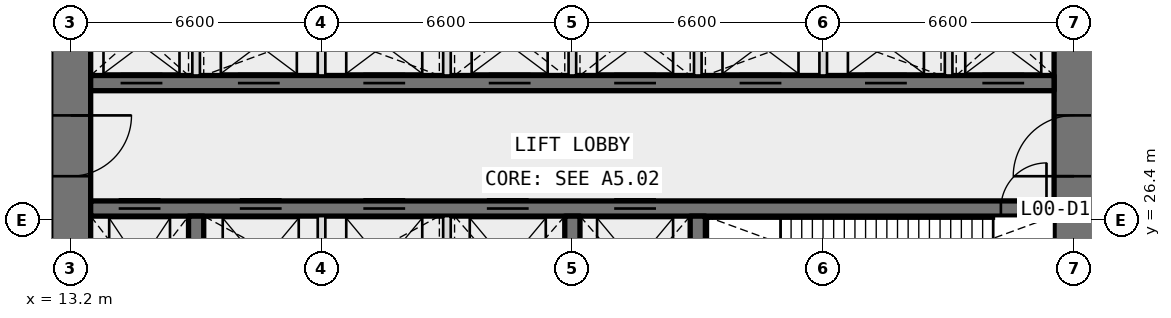
"""IFC4 building model, lengths in metres.
Left out: names, types, materials, properties, quantities, classifications, styles, units other than length and angle.
Written with IfcOpenShell. Run it as: python <this file> out.ifc"""

import sys

from ifc_helpers import new_model, si_unit, direction, frame, frame_2d, origin, place, context, subcontext, project, spatial, rectangle, extrude, element, fill, save


model = new_model("IFC4")
c1 = context("Model", 3, precision=1e-05, world=origin(), true_north=direction((0.0, 1.0)))
c2 = subcontext(c1, "Body", "Model", "MODEL_VIEW")
j1 = project(units=[si_unit("LENGTHUNIT", "METRE"), si_unit("PLANEANGLEUNIT", "RADIAN")], contexts=[c1])
p1 = place(None, origin())
s1 = spatial("IfcSite", under=j1, at=p1, CompositionType="ELEMENT")
p2 = place(p1, origin())
s2 = spatial("IfcBuilding", under=s1, at=p2, CompositionType="ELEMENT")
p3 = place(p2, origin())
s3 = spatial("IfcBuildingStorey", under=s2, at=p3, CompositionType="ELEMENT", Elevation=0.0)
p4 = place(p3, frame((39.6, 13.725, 0.0), z_axis=(0.0, 0.0, 1.0), x_axis=(0.0, 1.0, 0.0)))
e1 = element("IfcWall", 1, at=p4, inside=s3, PredefinedType="SHEAR", context=c2, shape_type="SweptSolid", body=[
    extrude(rectangle(XDim=18.75, YDim=1.05, at=frame_2d((9.375, 0.0))), origin(), (0.0, 0.0, 1.0), 7.2),
])
p5 = place(p4, frame((3.025, 0.0, 0.0)))
e2 = element("IfcOpeningElement", 2, at=p5, cuts=e1, PredefinedType="OPENING", context=c2, shape_type="SweptSolid", body=[
    extrude(rectangle(XDim=1.6, YDim=2.1, at=frame_2d((0.8, 1.05))), frame((0.0, 0.535, 0.0), z_axis=(0.0, -1.0, 0.0), x_axis=(1.0, 0.0, 0.0)), (0.0, 0.0, 1.0), 1.07),
])
p6 = place(p4, frame((13.825, 0.0, 0.0)))
e3 = element("IfcOpeningElement", 3, at=p6, cuts=e1, PredefinedType="OPENING", context=c2, shape_type="SweptSolid", body=[
    extrude(rectangle(XDim=1.6, YDim=2.1, at=frame_2d((0.8, 1.05))), frame((0.0, 0.535, 0.0), z_axis=(0.0, -1.0, 0.0), x_axis=(1.0, 0.0, 0.0)), (0.0, 0.0, 1.0), 1.07),
])
p7 = place(p3, frame((13.2, 32.475, 0.0), z_axis=(0.0, 0.0, 1.0), x_axis=(0.0, -1.0, 0.0)))
e4 = element("IfcWall", 4, at=p7, inside=s3, PredefinedType="SHEAR", context=c2, shape_type="SweptSolid", body=[
    extrude(rectangle(XDim=18.75, YDim=1.05, at=frame_2d((9.375, 0.0))), origin(), (0.0, 0.0, 1.0), 7.2),
])
p8 = place(p7, frame((14.125, 0.0, 0.0)))
e5 = element("IfcOpeningElement", 5, at=p8, cuts=e4, PredefinedType="OPENING", context=c2, shape_type="SweptSolid", body=[
    extrude(rectangle(XDim=1.6, YDim=2.1, at=frame_2d((0.8, 1.05))), frame((0.0, 0.535, 0.0), z_axis=(0.0, -1.0, 0.0), x_axis=(1.0, 0.0, 0.0)), (0.0, 0.0, 1.0), 1.07),
])
p9 = place(p7, frame((3.325, 0.0, 0.0)))
e6 = element("IfcOpeningElement", 6, at=p9, cuts=e4, PredefinedType="OPENING", context=c2, shape_type="SweptSolid", body=[
    extrude(rectangle(XDim=1.6, YDim=2.1, at=frame_2d((0.8, 1.05))), frame((0.0, 0.535, 0.0), z_axis=(0.0, -1.0, 0.0), x_axis=(1.0, 0.0, 0.0)), (0.0, 0.0, 1.0), 1.07),
])
p10 = place(p3, frame((13.725, 26.7, 0.0), z_axis=(0.0, 0.0, 1.0), x_axis=(1.0, 0.0, 0.0)))
e7 = element("IfcWall", 7, at=p10, inside=s3, PredefinedType="SHEAR", context=c2, shape_type="SweptSolid", body=[
    extrude(rectangle(XDim=25.35, YDim=0.4, at=frame_2d((12.675, 0.0))), origin(), (0.0, 0.0, 1.0), 7.2),
])
p11 = place(p10, frame((23.95, 0.0, 0.0)))
e8 = element("IfcOpeningElement", 8, at=p11, cuts=e7, PredefinedType="OPENING", context=c2, shape_type="SweptSolid", body=[
    extrude(rectangle(XDim=1.2, YDim=2.1, at=frame_2d((0.6, 1.05))), frame((0.0, 0.21, 0.0), z_axis=(0.0, -1.0, 0.0), x_axis=(1.0, 0.0, 0.0)), (0.0, 0.0, 1.0), 0.42),
])
p12 = place(p10, frame((0.738, 0.0, 0.0)))
e9 = element("IfcOpeningElement", 9, at=p12, cuts=e7, PredefinedType="OPENING", context=c2, shape_type="SweptSolid", body=[
    extrude(rectangle(XDim=1.1, YDim=2.1, at=frame_2d((0.55, 1.05))), frame((0.0, 0.21, 0.0), z_axis=(0.0, -1.0, 0.0), x_axis=(1.0, 0.0, 0.0)), (0.0, 0.0, 1.0), 0.42),
])
p13 = place(p10, frame((3.925, 0.0, 0.0)))
e10 = element("IfcOpeningElement", 10, at=p13, cuts=e7, PredefinedType="OPENING", context=c2, shape_type="SweptSolid", body=[
    extrude(rectangle(XDim=1.1, YDim=2.1, at=frame_2d((0.55, 1.05))), frame((0.0, 0.21, 0.0), z_axis=(0.0, -1.0, 0.0), x_axis=(1.0, 0.0, 0.0)), (0.0, 0.0, 1.0), 0.42),
])
p14 = place(p10, frame((7.175, 0.0, 0.0)))
e11 = element("IfcOpeningElement", 11, at=p14, cuts=e7, PredefinedType="OPENING", context=c2, shape_type="SweptSolid", body=[
    extrude(rectangle(XDim=1.1, YDim=2.1, at=frame_2d((0.55, 1.05))), frame((0.0, 0.21, 0.0), z_axis=(0.0, -1.0, 0.0), x_axis=(1.0, 0.0, 0.0)), (0.0, 0.0, 1.0), 0.42),
])
p15 = place(p10, frame((10.425, 0.0, 0.0)))
e12 = element("IfcOpeningElement", 12, at=p15, cuts=e7, PredefinedType="OPENING", context=c2, shape_type="SweptSolid", body=[
    extrude(rectangle(XDim=1.1, YDim=2.1, at=frame_2d((0.55, 1.05))), frame((0.0, 0.21, 0.0), z_axis=(0.0, -1.0, 0.0), x_axis=(1.0, 0.0, 0.0)), (0.0, 0.0, 1.0), 0.42),
])
p16 = place(p10, frame((13.775, 0.0, 0.0)))
e13 = element("IfcOpeningElement", 13, at=p16, cuts=e7, PredefinedType="OPENING", context=c2, shape_type="SweptSolid", body=[
    extrude(rectangle(XDim=1.1, YDim=2.1, at=frame_2d((0.55, 1.05))), frame((0.0, 0.21, 0.0), z_axis=(0.0, -1.0, 0.0), x_axis=(1.0, 0.0, 0.0)), (0.0, 0.0, 1.0), 0.42),
])
p17 = place(p3, frame((13.725, 30.0, 0.0), z_axis=(0.0, 0.0, 1.0), x_axis=(1.0, 0.0, 0.0)))
e14 = element("IfcWall", 14, at=p17, inside=s3, PredefinedType="SHEAR", context=c2, shape_type="SweptSolid", body=[
    extrude(rectangle(XDim=25.35, YDim=0.4, at=frame_2d((12.675, 0.0))), origin(), (0.0, 0.0, 1.0), 7.2),
])
p18 = place(p17, frame((0.788, 0.0, 0.0)))
e15 = element("IfcOpeningElement", 15, at=p18, cuts=e14, PredefinedType="OPENING", context=c2, shape_type="SweptSolid", body=[
    extrude(rectangle(XDim=1.1, YDim=2.1, at=frame_2d((0.55, 1.05))), frame((0.0, 0.21, 0.0), z_axis=(0.0, -1.0, 0.0), x_axis=(1.0, 0.0, 0.0)), (0.0, 0.0, 1.0), 0.42),
])
p19 = place(p17, frame((3.875, 0.0, 0.0)))
e16 = element("IfcOpeningElement", 16, at=p19, cuts=e14, PredefinedType="OPENING", context=c2, shape_type="SweptSolid", body=[
    extrude(rectangle(XDim=1.1, YDim=2.1, at=frame_2d((0.55, 1.05))), frame((0.0, 0.21, 0.0), z_axis=(0.0, -1.0, 0.0), x_axis=(1.0, 0.0, 0.0)), (0.0, 0.0, 1.0), 0.42),
])
p20 = place(p17, frame((7.175, 0.0, 0.0)))
e17 = element("IfcOpeningElement", 17, at=p20, cuts=e14, PredefinedType="OPENING", context=c2, shape_type="SweptSolid", body=[
    extrude(rectangle(XDim=1.1, YDim=2.1, at=frame_2d((0.55, 1.05))), frame((0.0, 0.21, 0.0), z_axis=(0.0, -1.0, 0.0), x_axis=(1.0, 0.0, 0.0)), (0.0, 0.0, 1.0), 0.42),
])
p21 = place(p17, frame((10.475, 0.0, 0.0)))
e18 = element("IfcOpeningElement", 18, at=p21, cuts=e14, PredefinedType="OPENING", context=c2, shape_type="SweptSolid", body=[
    extrude(rectangle(XDim=1.1, YDim=2.1, at=frame_2d((0.55, 1.05))), frame((0.0, 0.21, 0.0), z_axis=(0.0, -1.0, 0.0), x_axis=(1.0, 0.0, 0.0)), (0.0, 0.0, 1.0), 0.42),
])
p22 = place(p17, frame((13.775, 0.0, 0.0)))
e19 = element("IfcOpeningElement", 19, at=p22, cuts=e14, PredefinedType="OPENING", context=c2, shape_type="SweptSolid", body=[
    extrude(rectangle(XDim=1.1, YDim=2.1, at=frame_2d((0.55, 1.05))), frame((0.0, 0.21, 0.0), z_axis=(0.0, -1.0, 0.0), x_axis=(1.0, 0.0, 0.0)), (0.0, 0.0, 1.0), 0.42),
])
p23 = place(p17, frame((17.075, 0.0, 0.0)))
e20 = element("IfcOpeningElement", 20, at=p23, cuts=e14, PredefinedType="OPENING", context=c2, shape_type="SweptSolid", body=[
    extrude(rectangle(XDim=1.1, YDim=2.1, at=frame_2d((0.55, 1.05))), frame((0.0, 0.21, 0.0), z_axis=(0.0, -1.0, 0.0), x_axis=(1.0, 0.0, 0.0)), (0.0, 0.0, 1.0), 0.42),
])
p24 = place(p17, frame((20.375, 0.0, 0.0)))
e21 = element("IfcOpeningElement", 21, at=p24, cuts=e14, PredefinedType="OPENING", context=c2, shape_type="SweptSolid", body=[
    extrude(rectangle(XDim=1.1, YDim=2.1, at=frame_2d((0.55, 1.05))), frame((0.0, 0.21, 0.0), z_axis=(0.0, -1.0, 0.0), x_axis=(1.0, 0.0, 0.0)), (0.0, 0.0, 1.0), 0.42),
])
p25 = place(p17, frame((23.462, 0.0, 0.0)))
e22 = element("IfcOpeningElement", 22, at=p25, cuts=e14, PredefinedType="OPENING", context=c2, shape_type="SweptSolid", body=[
    extrude(rectangle(XDim=1.1, YDim=2.1, at=frame_2d((0.55, 1.05))), frame((0.0, 0.21, 0.0), z_axis=(0.0, -1.0, 0.0), x_axis=(1.0, 0.0, 0.0)), (0.0, 0.0, 1.0), 0.42),
])
for number, where, z_axis, x_axis in (
    (23, (16.5, 23.15, 0.0), (0.0, 0.0, 1.0), (0.0, 1.0, 0.0)),
    (24, (26.4, 23.15, 0.0), (0.0, 0.0, 1.0), (0.0, 1.0, 0.0)),
    (25, (29.7, 23.15, 0.0), (0.0, 0.0, 1.0), (0.0, 1.0, 0.0)),
):
    element("IfcWall", number, at=place(p3, frame(where, z_axis=z_axis, x_axis=x_axis)), inside=s3, PredefinedType="SHEAR", context=c2, shape_type="SweptSolid", body=[
        extrude(rectangle(XDim=3.35, YDim=0.4, at=frame_2d((1.675, 0.0))), origin(), (0.0, 0.0, 1.0), 7.2),
    ])
for number, where, z_axis, x_axis in (
    (26, (16.5, 30.2, 0.0), (0.0, 0.0, 1.0), (0.0, 1.0, 0.0)),
    (27, (19.8, 30.2, 0.0), (0.0, 0.0, 1.0), (0.0, 1.0, 0.0)),
    (28, (23.1, 30.2, 0.0), (0.0, 0.0, 1.0), (0.0, 1.0, 0.0)),
    (29, (26.4, 30.2, 0.0), (0.0, 0.0, 1.0), (0.0, 1.0, 0.0)),
    (30, (29.7, 30.2, 0.0), (0.0, 0.0, 1.0), (0.0, 1.0, 0.0)),
    (31, (33.0, 30.2, 0.0), (0.0, 0.0, 1.0), (0.0, 1.0, 0.0)),
    (32, (36.3, 30.2, 0.0), (0.0, 0.0, 1.0), (0.0, 1.0, 0.0)),
):
    element("IfcWall", number, at=place(p3, frame(where, z_axis=z_axis, x_axis=x_axis)), inside=s3, PredefinedType="PARTITIONING", context=c2, shape_type="SweptSolid", body=[
        extrude(rectangle(XDim=2.275, YDim=0.2, at=frame_2d((1.138, 0.0))), origin(), (0.0, 0.0, 1.0), 7.2),
    ])
for number, where, z_axis, x_axis in (
    (33, (19.8, 23.15, 0.0), (0.0, 0.0, 1.0), (0.0, 1.0, 0.0)),
    (34, (23.1, 23.15, 0.0), (0.0, 0.0, 1.0), (0.0, 1.0, 0.0)),
):
    element("IfcWall", number, at=place(p3, frame(where, z_axis=z_axis, x_axis=x_axis)), inside=s3, PredefinedType="PARTITIONING", context=c2, shape_type="SweptSolid", body=[
        extrude(rectangle(XDim=3.35, YDim=0.2, at=frame_2d((1.675, 0.0))), origin(), (0.0, 0.0, 1.0), 7.2),
    ])
p26 = place(p11, origin())
e35 = element("IfcDoor", 35, at=p26, inside=s3, OperationType="SINGLE_SWING_RIGHT", PredefinedType="DOOR", context=c2, shape_type="SweptSolid", body=[
    extrude(rectangle(XDim=1.2, YDim=2.1, at=frame_2d((0.6, 1.05))), frame((0.0, 0.025, 0.0), z_axis=(0.0, -1.0, 0.0), x_axis=(1.0, 0.0, 0.0)), (0.0, 0.0, 1.0), 0.05),
])
fill(e8, e35)
p27 = place(p9, origin())
e36 = element("IfcDoor", 36, at=p27, inside=s3, OperationType="DOUBLE_DOOR_DOUBLE_SWING", PredefinedType="DOOR", context=c2, shape_type="SweptSolid", body=[
    extrude(rectangle(XDim=1.6, YDim=2.1, at=frame_2d((0.8, 1.05))), frame((0.0, 0.025, 0.0), z_axis=(0.0, -1.0, 0.0), x_axis=(1.0, 0.0, 0.0)), (0.0, 0.0, 1.0), 0.05),
])
fill(e6, e36)
p28 = place(p6, origin())
e37 = element("IfcDoor", 37, at=p28, inside=s3, OperationType="DOUBLE_DOOR_DOUBLE_SWING", PredefinedType="DOOR", context=c2, shape_type="SweptSolid", body=[
    extrude(rectangle(XDim=1.6, YDim=2.1, at=frame_2d((0.8, 1.05))), frame((0.0, 0.025, 0.0), z_axis=(0.0, -1.0, 0.0), x_axis=(1.0, 0.0, 0.0)), (0.0, 0.0, 1.0), 0.05),
])
fill(e3, e37)
p29 = place(p18, origin())
e38 = element("IfcDoor", 38, at=p29, inside=s3, OperationType="DOUBLE_DOOR_SLIDING", PredefinedType="DOOR", context=c2, shape_type="SweptSolid", body=[
    extrude(rectangle(XDim=1.1, YDim=2.1, at=frame_2d((0.55, 1.05))), frame((0.0, 0.025, 0.0), z_axis=(0.0, -1.0, 0.0), x_axis=(1.0, 0.0, 0.0)), (0.0, 0.0, 1.0), 0.05),
])
fill(e15, e38)
p30 = place(p19, origin())
e39 = element("IfcDoor", 39, at=p30, inside=s3, OperationType="DOUBLE_DOOR_SLIDING", PredefinedType="DOOR", context=c2, shape_type="SweptSolid", body=[
    extrude(rectangle(XDim=1.1, YDim=2.1, at=frame_2d((0.55, 1.05))), frame((0.0, 0.025, 0.0), z_axis=(0.0, -1.0, 0.0), x_axis=(1.0, 0.0, 0.0)), (0.0, 0.0, 1.0), 0.05),
])
fill(e16, e39)
p31 = place(p20, origin())
e40 = element("IfcDoor", 40, at=p31, inside=s3, OperationType="DOUBLE_DOOR_SLIDING", PredefinedType="DOOR", context=c2, shape_type="SweptSolid", body=[
    extrude(rectangle(XDim=1.1, YDim=2.1, at=frame_2d((0.55, 1.05))), frame((0.0, 0.025, 0.0), z_axis=(0.0, -1.0, 0.0), x_axis=(1.0, 0.0, 0.0)), (0.0, 0.0, 1.0), 0.05),
])
fill(e17, e40)
p32 = place(p21, origin())
e41 = element("IfcDoor", 41, at=p32, inside=s3, OperationType="DOUBLE_DOOR_SLIDING", PredefinedType="DOOR", context=c2, shape_type="SweptSolid", body=[
    extrude(rectangle(XDim=1.1, YDim=2.1, at=frame_2d((0.55, 1.05))), frame((0.0, 0.025, 0.0), z_axis=(0.0, -1.0, 0.0), x_axis=(1.0, 0.0, 0.0)), (0.0, 0.0, 1.0), 0.05),
])
fill(e18, e41)
p33 = place(p22, origin())
e42 = element("IfcDoor", 42, at=p33, inside=s3, OperationType="DOUBLE_DOOR_SLIDING", PredefinedType="DOOR", context=c2, shape_type="SweptSolid", body=[
    extrude(rectangle(XDim=1.1, YDim=2.1, at=frame_2d((0.55, 1.05))), frame((0.0, 0.025, 0.0), z_axis=(0.0, -1.0, 0.0), x_axis=(1.0, 0.0, 0.0)), (0.0, 0.0, 1.0), 0.05),
])
fill(e19, e42)
p34 = place(p23, origin())
e43 = element("IfcDoor", 43, at=p34, inside=s3, OperationType="DOUBLE_DOOR_SLIDING", PredefinedType="DOOR", context=c2, shape_type="SweptSolid", body=[
    extrude(rectangle(XDim=1.1, YDim=2.1, at=frame_2d((0.55, 1.05))), frame((0.0, 0.025, 0.0), z_axis=(0.0, -1.0, 0.0), x_axis=(1.0, 0.0, 0.0)), (0.0, 0.0, 1.0), 0.05),
])
fill(e20, e43)
p35 = place(p24, origin())
e44 = element("IfcDoor", 44, at=p35, inside=s3, OperationType="DOUBLE_DOOR_SLIDING", PredefinedType="DOOR", context=c2, shape_type="SweptSolid", body=[
    extrude(rectangle(XDim=1.1, YDim=2.1, at=frame_2d((0.55, 1.05))), frame((0.0, 0.025, 0.0), z_axis=(0.0, -1.0, 0.0), x_axis=(1.0, 0.0, 0.0)), (0.0, 0.0, 1.0), 0.05),
])
fill(e21, e44)
p36 = place(p25, origin())
e45 = element("IfcDoor", 45, at=p36, inside=s3, OperationType="DOUBLE_DOOR_SLIDING", PredefinedType="DOOR", context=c2, shape_type="SweptSolid", body=[
    extrude(rectangle(XDim=1.1, YDim=2.1, at=frame_2d((0.55, 1.05))), frame((0.0, 0.025, 0.0), z_axis=(0.0, -1.0, 0.0), x_axis=(1.0, 0.0, 0.0)), (0.0, 0.0, 1.0), 0.05),
])
fill(e22, e45)
p37 = place(p12, origin())
e46 = element("IfcDoor", 46, at=p37, inside=s3, OperationType="DOUBLE_DOOR_SLIDING", PredefinedType="DOOR", context=c2, shape_type="SweptSolid", body=[
    extrude(rectangle(XDim=1.1, YDim=2.1, at=frame_2d((0.55, 1.05))), frame((0.0, 0.025, 0.0), z_axis=(0.0, -1.0, 0.0), x_axis=(1.0, 0.0, 0.0)), (0.0, 0.0, 1.0), 0.05),
])
fill(e9, e46)
p38 = place(p13, origin())
e47 = element("IfcDoor", 47, at=p38, inside=s3, OperationType="DOUBLE_DOOR_SLIDING", PredefinedType="DOOR", context=c2, shape_type="SweptSolid", body=[
    extrude(rectangle(XDim=1.1, YDim=2.1, at=frame_2d((0.55, 1.05))), frame((0.0, 0.025, 0.0), z_axis=(0.0, -1.0, 0.0), x_axis=(1.0, 0.0, 0.0)), (0.0, 0.0, 1.0), 0.05),
])
fill(e10, e47)
p39 = place(p14, origin())
e48 = element("IfcDoor", 48, at=p39, inside=s3, OperationType="DOUBLE_DOOR_SLIDING", PredefinedType="DOOR", context=c2, shape_type="SweptSolid", body=[
    extrude(rectangle(XDim=1.1, YDim=2.1, at=frame_2d((0.55, 1.05))), frame((0.0, 0.025, 0.0), z_axis=(0.0, -1.0, 0.0), x_axis=(1.0, 0.0, 0.0)), (0.0, 0.0, 1.0), 0.05),
])
fill(e11, e48)
p40 = place(p15, origin())
e49 = element("IfcDoor", 49, at=p40, inside=s3, OperationType="DOUBLE_DOOR_SLIDING", PredefinedType="DOOR", context=c2, shape_type="SweptSolid", body=[
    extrude(rectangle(XDim=1.1, YDim=2.1, at=frame_2d((0.55, 1.05))), frame((0.0, 0.025, 0.0), z_axis=(0.0, -1.0, 0.0), x_axis=(1.0, 0.0, 0.0)), (0.0, 0.0, 1.0), 0.05),
])
fill(e12, e49)
p41 = place(p16, origin())
e50 = element("IfcDoor", 50, at=p41, inside=s3, OperationType="DOUBLE_DOOR_SLIDING", PredefinedType="DOOR", context=c2, shape_type="SweptSolid", body=[
    extrude(rectangle(XDim=1.1, YDim=2.1, at=frame_2d((0.55, 1.05))), frame((0.0, 0.025, 0.0), z_axis=(0.0, -1.0, 0.0), x_axis=(1.0, 0.0, 0.0)), (0.0, 0.0, 1.0), 0.05),
])
fill(e13, e50)
save(model, sys.argv[1])
